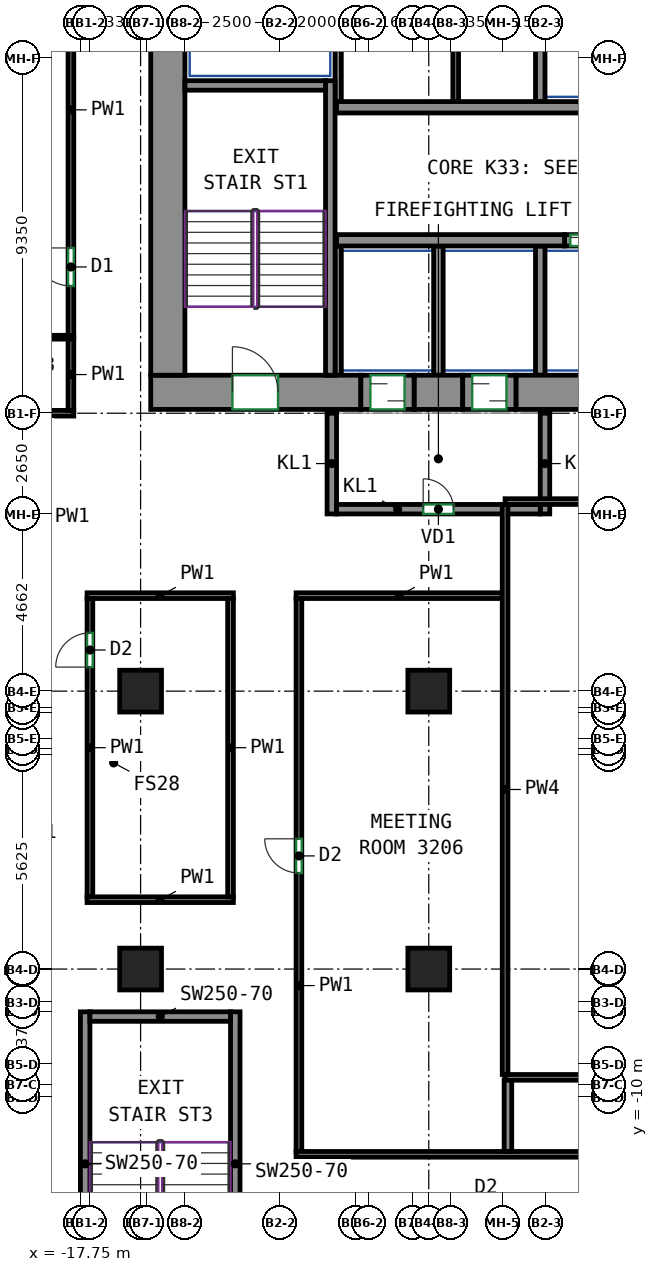
"""IFC4 building model, lengths in metres.
Left out: names, types, materials, properties, quantities, classifications, styles, units other than length and angle.
Written with IfcOpenShell. Run it as: python <this file> out.ifc"""

import sys

from ifc_helpers import new_model, si_unit, direction, frame, frame_2d, origin, origin_2d, place, context, subcontext, project, spatial, rectangle, extrude, source, transform, mapped, element, fill, save


model = new_model("IFC4")
c1 = context("Model", 3, precision=1e-05, world=origin(), true_north=direction((0.0, 1.0)))
c2 = subcontext(c1, "Body", "Model", "MODEL_VIEW")
j1 = project(units=[si_unit("LENGTHUNIT", "METRE"), si_unit("PLANEANGLEUNIT", "RADIAN")], contexts=[c1])
p1 = place(None, origin())
s1 = spatial("IfcSite", under=j1, at=p1, CompositionType="ELEMENT")
p2 = place(p1, origin())
s2 = spatial("IfcBuilding", under=s1, at=p2, CompositionType="ELEMENT")
p3 = place(p2, frame((0.0, 0.0, 143.9)))
s3 = spatial("IfcBuildingStorey", under=s2, at=p3, CompositionType="ELEMENT", Elevation=143.9)
m1 = source(origin(), c2, "Body", "SweptSolid", [
    extrude(rectangle(XDim=1.1, YDim=1.1, at=origin_2d()), origin(), (0.0, 0.0, 1.0), 3.12),
])
for number, where, z_axis, x_axis in (
    (1, (-16.167, -6.625, 0.0), (0.0, 0.0, 1.0), (1.0, 0.0, 0.0)),
    (2, (-16.167, 0.688, 0.0), (0.0, 0.0, 1.0), (1.0, 0.0, 0.0)),
    (3, (-8.583, -6.625, 0.0), (0.0, 0.0, 1.0), (1.0, 0.0, 0.0)),
    (4, (-8.583, 0.688, 0.0), (0.0, 0.0, 1.0), (1.0, 0.0, 0.0)),
):
    element("IfcColumn", number, at=place(p3, frame(where, z_axis=z_axis, x_axis=x_axis)), inside=s3, PredefinedType="COLUMN", context=c2, shape_type="MappedRepresentation", body=[
        mapped(m1, transform((0.0, 0.0, 0.0))),
    ])
m2 = source(origin(), c2, "Body", "SweptSolid", [
    extrude(rectangle(XDim=5.53, YDim=0.9, at=frame_2d((2.765, 0.0))), origin(), (0.0, 0.0, 1.0), 3.12),
])
p4 = place(p3, frame((-15.9, 8.55, 0.0), z_axis=(0.0, 0.0, 1.0), x_axis=(1.0, 0.0, 0.0)))
e5 = element("IfcWall", 5, at=p4, inside=s3, PredefinedType="SHEAR", context=c2, shape_type="MappedRepresentation", body=[
    mapped(m2, transform((0.0, 0.0, 0.0))),
])
p5 = place(p4, frame((2.15, 0.0, 0.0)))
e6 = element("IfcOpeningElement", 6, at=p5, cuts=e5, PredefinedType="OPENING", context=c2, shape_type="SweptSolid", body=[
    extrude(rectangle(XDim=1.2, YDim=2.1, at=frame_2d((0.6, 1.05))), frame((0.0, 0.46, 0.0), z_axis=(0.0, -1.0, 0.0), x_axis=(1.0, 0.0, 0.0)), (0.0, 0.0, 1.0), 0.92),
])
m3 = source(origin(), c2, "Body", "SweptSolid", [
    extrude(rectangle(XDim=1.28, YDim=0.9, at=frame_2d((0.64, 0.0))), origin(), (0.0, 0.0, 1.0), 3.12),
])
p6 = place(p3, frame((-8.97, 8.55, 0.0), z_axis=(0.0, 0.0, 1.0), x_axis=(1.0, 0.0, 0.0)))
e7 = element("IfcWall", 7, at=p6, inside=s3, PredefinedType="SHEAR", context=c2, shape_type="MappedRepresentation", body=[
    mapped(m3, transform((0.0, 0.0, 0.0))),
])
m4 = source(origin(), c2, "Body", "SweptSolid", [
    extrude(rectangle(XDim=14.18, YDim=0.9, at=frame_2d((7.09, 0.0))), origin(), (0.0, 0.0, 1.0), 3.12),
])
p7 = place(p3, frame((-6.29, 8.55, 0.0), z_axis=(0.0, 0.0, 1.0), x_axis=(1.0, 0.0, 0.0)))
e8 = element("IfcWall", 8, at=p7, inside=s3, PredefinedType="SHEAR", context=c2, shape_type="MappedRepresentation", body=[
    mapped(m4, transform((0.0, 0.0, 0.0))),
])
m5 = source(origin(), c2, "Body", "SweptSolid", [
    extrude(rectangle(XDim=12.0, YDim=0.9, at=frame_2d((6.0, 0.0))), origin(), (0.0, 0.0, 1.0), 3.12),
])
p8 = place(p3, frame((-15.45, 9.0, 0.0), z_axis=(0.0, 0.0, 1.0), x_axis=(0.0, 1.0, 0.0)))
e9 = element("IfcWall", 9, at=p8, inside=s3, PredefinedType="SHEAR", context=c2, shape_type="MappedRepresentation", body=[
    mapped(m5, transform((0.0, 0.0, 0.0))),
])
m6 = source(origin(), c2, "Body", "SweptSolid", [
    extrude(rectangle(XDim=7.75, YDim=0.25, at=frame_2d((3.875, 0.0))), origin(), (0.0, 0.0, 1.0), 3.12),
])
p9 = place(p3, frame((-11.175, 9.0, 0.0), z_axis=(0.0, 0.0, 1.0), x_axis=(0.0, 1.0, 0.0)))
e10 = element("IfcWall", 10, at=p9, inside=s3, PredefinedType="SHEAR", context=c2, shape_type="MappedRepresentation", body=[
    mapped(m6, transform((0.0, 0.0, 0.0))),
])
m7 = source(origin(), c2, "Body", "SweptSolid", [
    extrude(rectangle(XDim=3.7, YDim=0.25, at=frame_2d((1.85, 0.0))), origin(), (0.0, 0.0, 1.0), 3.12),
])
p10 = place(p3, frame((-15.0, 16.625, 0.0), z_axis=(0.0, 0.0, 1.0), x_axis=(1.0, 0.0, 0.0)))
e11 = element("IfcWall", 11, at=p10, inside=s3, PredefinedType="SHEAR", context=c2, shape_type="MappedRepresentation", body=[
    mapped(m7, transform((0.0, 0.0, 0.0))),
])
m8 = source(origin(), c2, "Body", "SweptSolid", [
    extrude(rectangle(XDim=8.0, YDim=0.25, at=frame_2d((4.0, 0.0))), origin(), (0.0, 0.0, 1.0), 3.12),
])
for number, where, z_axis, x_axis in (
    (12, (-17.625, -15.75, 0.0), (0.0, 0.0, 1.0), (0.0, 1.0, 0.0)),
    (13, (-13.675, -15.75, 0.0), (0.0, 0.0, 1.0), (0.0, 1.0, 0.0)),
):
    element("IfcWall", number, at=place(p3, frame(where, z_axis=z_axis, x_axis=x_axis)), inside=s3, PredefinedType="SHEAR", context=c2, shape_type="MappedRepresentation", body=[
        mapped(m8, transform((0.0, 0.0, 0.0))),
    ])
p11 = place(p3, frame((-17.5, -7.875, 0.0), z_axis=(0.0, 0.0, 1.0), x_axis=(1.0, 0.0, 0.0)))
e14 = element("IfcWall", 14, at=p11, inside=s3, PredefinedType="SHEAR", context=c2, shape_type="MappedRepresentation", body=[
    mapped(m7, transform((0.0, 0.0, 0.0))),
])
m9 = source(origin(), c2, "Body", "SweptSolid", [
    extrude(rectangle(XDim=6.0, YDim=0.3, at=frame_2d((3.0, 0.0))), origin(), (0.0, 0.0, 1.0), 3.12),
])
p12 = place(p3, frame((-11.01, 12.55, 0.0), z_axis=(0.0, 0.0, 1.0), x_axis=(1.0, 0.0, 0.0)))
e15 = element("IfcWall", 15, at=p12, inside=s3, PredefinedType="SHEAR", context=c2, shape_type="MappedRepresentation", body=[
    mapped(m9, transform((0.0, 0.0, 0.0))),
])
m10 = source(origin(), c2, "Body", "SweptSolid", [
    extrude(rectangle(XDim=14.04, YDim=0.3, at=frame_2d((7.02, 0.0))), origin(), (0.0, 0.0, 1.0), 3.12),
])
p13 = place(p3, frame((-11.01, 16.05, 0.0), z_axis=(0.0, 0.0, 1.0), x_axis=(1.0, 0.0, 0.0)))
e16 = element("IfcWall", 16, at=p13, inside=s3, PredefinedType="SHEAR", context=c2, shape_type="MappedRepresentation", body=[
    mapped(m10, transform((0.0, 0.0, 0.0))),
])
m11 = source(origin(), c2, "Body", "SweptSolid", [
    extrude(rectangle(XDim=1.4, YDim=0.3, at=frame_2d((0.7, 0.0))), origin(), (0.0, 0.0, 1.0), 3.12),
])
p14 = place(p3, frame((-5.01, 12.55, 0.0), z_axis=(0.0, 0.0, 1.0), x_axis=(1.0, 0.0, 0.0)))
e17 = element("IfcWall", 17, at=p14, inside=s3, PredefinedType="PARTITIONING", context=c2, shape_type="MappedRepresentation", body=[
    mapped(m11, transform((0.0, 0.0, 0.0))),
])
p15 = place(p14, frame((0.15, 0.0, 0.0)))
e18 = element("IfcOpeningElement", 18, at=p15, cuts=e17, PredefinedType="OPENING", context=c2, shape_type="SweptSolid", body=[
    extrude(rectangle(XDim=1.1, YDim=2.1, at=frame_2d((0.55, 1.05))), frame((0.0, 0.16, 0.0), z_axis=(0.0, -1.0, 0.0), x_axis=(1.0, 0.0, 0.0)), (0.0, 0.0, 1.0), 0.32),
])
m12 = source(origin(), c2, "Body", "SweptSolid", [
    extrude(rectangle(XDim=2.65, YDim=0.25, at=frame_2d((1.325, 0.0))), origin(), (0.0, 0.0, 1.0), 3.12),
])
for number, where, z_axis, x_axis in (
    (19, (-11.135, 5.35, 0.0), (0.0, 0.0, 1.0), (0.0, 1.0, 0.0)),
    (20, (-5.525, 5.35, 0.0), (0.0, 0.0, 1.0), (0.0, 1.0, 0.0)),
):
    element("IfcWall", number, at=place(p3, frame(where, z_axis=z_axis, x_axis=x_axis)), inside=s3, PredefinedType="PARTITIONING", context=c2, shape_type="MappedRepresentation", body=[
        mapped(m12, transform((0.0, 0.0, 0.0))),
    ])
m13 = source(origin(), c2, "Body", "SweptSolid", [
    extrude(rectangle(XDim=5.36, YDim=0.25, at=frame_2d((2.68, 0.0))), origin(), (0.0, 0.0, 1.0), 3.12),
])
p16 = place(p3, frame((-11.01, 5.475, 0.0), z_axis=(0.0, 0.0, 1.0), x_axis=(1.0, 0.0, 0.0)))
e21 = element("IfcWall", 21, at=p16, inside=s3, PredefinedType="PARTITIONING", context=c2, shape_type="MappedRepresentation", body=[
    mapped(m13, transform((0.0, 0.0, 0.0))),
])
p17 = place(p16, frame((2.28, 0.0, 0.0)))
e22 = element("IfcOpeningElement", 22, at=p17, cuts=e21, PredefinedType="OPENING", context=c2, shape_type="SweptSolid", body=[
    extrude(rectangle(XDim=0.8, YDim=2.0, at=frame_2d((0.4, 1.0))), frame((0.0, 0.135, 0.0), z_axis=(0.0, -1.0, 0.0), x_axis=(1.0, 0.0, 0.0)), (0.0, 0.0, 1.0), 0.27),
])
m14 = source(origin(), c2, "Body", "SweptSolid", [
    extrude(rectangle(XDim=4.8, YDim=0.165, at=frame_2d((2.4, 0.0))), origin(), (0.0, 0.0, 1.0), 3.12),
])
p18 = place(p3, frame((-10.968, 16.2, 0.0), z_axis=(0.0, 0.0, 1.0), x_axis=(0.0, 1.0, 0.0)))
e23 = element("IfcWall", 23, at=p18, inside=s3, PredefinedType="PARTITIONING", context=c2, shape_type="MappedRepresentation", body=[
    mapped(m14, transform((0.0, 0.0, 0.0))),
])
m15 = source(origin(), c2, "Body", "SweptSolid", [
    extrude(rectangle(XDim=3.275, YDim=0.25, at=frame_2d((1.638, 0.0))), origin(), (0.0, 0.0, 1.0), 3.12),
])
p19 = place(p3, frame((-5.65, 16.2, 0.0), z_axis=(0.0, 0.0, 1.0), x_axis=(0.0, 1.0, 0.0)))
e24 = element("IfcWall", 24, at=p19, inside=s3, PredefinedType="PARTITIONING", context=c2, shape_type="MappedRepresentation", body=[
    mapped(m15, transform((0.0, 0.0, 0.0))),
])
m16 = source(origin(), c2, "Body", "SweptSolid", [
    extrude(rectangle(XDim=3.4, YDim=0.165, at=frame_2d((1.7, 0.0))), origin(), (0.0, 0.0, 1.0), 3.12),
])
p20 = place(p3, frame((-10.968, 9.0, 0.0), z_axis=(0.0, 0.0, 1.0), x_axis=(0.0, 1.0, 0.0)))
e25 = element("IfcWall", 25, at=p20, inside=s3, PredefinedType="PARTITIONING", context=c2, shape_type="MappedRepresentation", body=[
    mapped(m16, transform((0.0, 0.0, 0.0))),
])
m17 = source(origin(), c2, "Body", "SweptSolid", [
    extrude(rectangle(XDim=3.4, YDim=0.25, at=frame_2d((1.7, 0.0))), origin(), (0.0, 0.0, 1.0), 3.12),
])
for number, where, z_axis, x_axis in (
    (26, (-5.65, 9.0, 0.0), (0.0, 0.0, 1.0), (0.0, 1.0, 0.0)),
    (27, (-8.33, 9.0, 0.0), (0.0, 0.0, 1.0), (0.0, 1.0, 0.0)),
):
    element("IfcWall", number, at=place(p3, frame(where, z_axis=z_axis, x_axis=x_axis)), inside=s3, PredefinedType="PARTITIONING", context=c2, shape_type="MappedRepresentation", body=[
        mapped(m17, transform((0.0, 0.0, 0.0))),
    ])
m18 = source(origin(), c2, "Body", "SweptSolid", [
    extrude(rectangle(XDim=4.8, YDim=0.15, at=frame_2d((2.4, 0.0))), origin(), (0.0, 0.0, 1.0), 3.12),
])
p21 = place(p3, frame((-7.875, 16.2, 0.0), z_axis=(0.0, 0.0, 1.0), x_axis=(0.0, 1.0, 0.0)))
e28 = element("IfcWall", 28, at=p21, inside=s3, PredefinedType="PARTITIONING", context=c2, shape_type="MappedRepresentation", body=[
    mapped(m18, transform((0.0, 0.0, 0.0))),
])
m19 = source(origin(), c2, "Body", "SweptSolid", [
    extrude(rectangle(XDim=1.4, YDim=0.9, at=frame_2d((0.7, 0.0))), origin(), (0.0, 0.0, 1.0), 2.7),
])
p22 = place(p3, frame((-10.37, 8.55, 0.0), z_axis=(0.0, 0.0, 1.0), x_axis=(1.0, 0.0, 0.0)))
e29 = element("IfcWall", 29, at=p22, inside=s3, PredefinedType="PARTITIONING", context=c2, shape_type="MappedRepresentation", body=[
    mapped(m19, transform((0.0, 0.0, 0.0))),
])
p23 = place(p22, frame((0.25, 0.0, 0.0)))
e30 = element("IfcOpeningElement", 30, at=p23, cuts=e29, PredefinedType="OPENING", context=c2, shape_type="SweptSolid", body=[
    extrude(rectangle(XDim=0.9, YDim=2.1, at=frame_2d((0.45, 1.05))), frame((0.0, 0.46, 0.0), z_axis=(0.0, -1.0, 0.0), x_axis=(1.0, 0.0, 0.0)), (0.0, 0.0, 1.0), 0.92),
])
m20 = source(origin(), c2, "Body", "SweptSolid", [
    extrude(rectangle(XDim=1.4, YDim=0.9, at=frame_2d((0.7, 0.0))), origin(), (0.0, 0.0, 1.0), 2.7),
])
p24 = place(p3, frame((-7.69, 8.55, 0.0), z_axis=(0.0, 0.0, 1.0), x_axis=(1.0, 0.0, 0.0)))
e31 = element("IfcWall", 31, at=p24, inside=s3, PredefinedType="PARTITIONING", context=c2, shape_type="MappedRepresentation", body=[
    mapped(m20, transform((0.0, 0.0, 0.0))),
])
p25 = place(p24, frame((0.25, 0.0, 0.0)))
e32 = element("IfcOpeningElement", 32, at=p25, cuts=e31, PredefinedType="OPENING", context=c2, shape_type="SweptSolid", body=[
    extrude(rectangle(XDim=0.9, YDim=2.1, at=frame_2d((0.45, 1.05))), frame((0.0, 0.46, 0.0), z_axis=(0.0, -1.0, 0.0), x_axis=(1.0, 0.0, 0.0)), (0.0, 0.0, 1.0), 0.92),
])
p26 = place(p3, frame((-18.0, 10.04, 0.0), z_axis=(0.0, 0.0, 1.0), x_axis=(0.0, 1.0, 0.0)))
e33 = element("IfcWall", 33, at=p26, inside=s3, PredefinedType="PARTITIONING", context=c2, shape_type="SweptSolid", body=[
    extrude(rectangle(XDim=11.885, YDim=0.15, at=frame_2d((5.942, 0.0))), origin(), (0.0, 0.0, 1.0), 3.12),
])
p27 = place(p26, frame((1.309, 0.0, 0.0)))
e34 = element("IfcOpeningElement", 34, at=p27, cuts=e33, PredefinedType="OPENING", context=c2, shape_type="SweptSolid", body=[
    extrude(rectangle(XDim=1.0, YDim=2.1, at=frame_2d((0.5, 1.05))), frame((0.0, 0.085, 0.0), z_axis=(0.0, -1.0, 0.0), x_axis=(1.0, 0.0, 0.0)), (0.0, 0.0, 1.0), 0.17),
])
p28 = place(p3, frame((-17.925, 8.0, 0.0), z_axis=(0.0, 0.0, 1.0), x_axis=(-1.0, 0.0, 0.0)))
e35 = element("IfcWall", 35, at=p28, inside=s3, PredefinedType="PARTITIONING", context=c2, shape_type="SweptSolid", body=[
    extrude(rectangle(XDim=2.034, YDim=0.15, at=frame_2d((1.017, 0.0))), origin(), (0.0, 0.0, 1.0), 3.12),
])
p29 = place(p3, frame((-18.0, 8.075, 0.0), z_axis=(0.0, 0.0, 1.0), x_axis=(0.0, 1.0, 0.0)))
e36 = element("IfcWall", 36, at=p29, inside=s3, PredefinedType="PARTITIONING", context=c2, shape_type="SweptSolid", body=[
    extrude(rectangle(XDim=1.885, YDim=0.15, at=frame_2d((0.942, 0.0))), origin(), (0.0, 0.0, 1.0), 3.12),
])
p30 = place(p3, frame((-12.075, 3.2, 0.0), z_axis=(0.0, 0.0, 1.0), x_axis=(1.0, 0.0, 0.0)))
e37 = element("IfcWall", 37, at=p30, inside=s3, PredefinedType="PARTITIONING", context=c2, shape_type="SweptSolid", body=[
    extrude(rectangle(XDim=5.425, YDim=0.15, at=frame_2d((2.712, 0.0))), origin(), (0.0, 0.0, 1.0), 3.12),
])
p31 = place(p3, frame((-12.0, -11.425, 0.0), z_axis=(0.0, 0.0, 1.0), x_axis=(0.0, 1.0, 0.0)))
e38 = element("IfcWall", 38, at=p31, inside=s3, PredefinedType="PARTITIONING", context=c2, shape_type="SweptSolid", body=[
    extrude(rectangle(XDim=14.55, YDim=0.15, at=frame_2d((7.275, 0.0))), origin(), (0.0, 0.0, 1.0), 3.12),
])
p32 = place(p31, frame((7.327, 0.0, 0.0)))
e39 = element("IfcOpeningElement", 39, at=p32, cuts=e38, PredefinedType="OPENING", context=c2, shape_type="SweptSolid", body=[
    extrude(rectangle(XDim=0.9, YDim=2.1, at=frame_2d((0.45, 1.05))), frame((0.0, 0.085, 0.0), z_axis=(0.0, -1.0, 0.0), x_axis=(1.0, 0.0, 0.0)), (0.0, 0.0, 1.0), 0.17),
])
p33 = place(p3, frame((-12.075, -11.5, 0.0), z_axis=(0.0, 0.0, 1.0), x_axis=(1.0, 0.0, 0.0)))
e40 = element("IfcWall", 40, at=p33, inside=s3, PredefinedType="PARTITIONING", context=c2, shape_type="SweptSolid", body=[
    extrude(rectangle(XDim=28.35, YDim=0.15, at=frame_2d((14.175, 0.0))), origin(), (0.0, 0.0, 1.0), 3.12),
])
p34 = place(p33, frame((13.677, 0.0, 0.0)))
e41 = element("IfcOpeningElement", 41, at=p34, cuts=e40, PredefinedType="OPENING", context=c2, shape_type="SweptSolid", body=[
    extrude(rectangle(XDim=0.9, YDim=2.1, at=frame_2d((0.45, 1.05))), frame((0.0, 0.085, 0.0), z_axis=(0.0, -1.0, 0.0), x_axis=(1.0, 0.0, 0.0)), (0.0, 0.0, 1.0), 0.17),
])
p35 = place(p3, frame((-17.575, 3.2, 0.0), z_axis=(0.0, 0.0, 1.0), x_axis=(1.0, 0.0, 0.0)))
e42 = element("IfcWall", 42, at=p35, inside=s3, PredefinedType="PARTITIONING", context=c2, shape_type="SweptSolid", body=[
    extrude(rectangle(XDim=3.85, YDim=0.15, at=frame_2d((1.925, 0.0))), origin(), (0.0, 0.0, 1.0), 3.12),
])
p36 = place(p3, frame((-17.5, -4.725, 0.0), z_axis=(0.0, 0.0, 1.0), x_axis=(0.0, 1.0, 0.0)))
e43 = element("IfcWall", 43, at=p36, inside=s3, PredefinedType="PARTITIONING", context=c2, shape_type="SweptSolid", body=[
    extrude(rectangle(XDim=7.85, YDim=0.15, at=frame_2d((3.925, 0.0))), origin(), (0.0, 0.0, 1.0), 3.12),
])
p37 = place(p36, frame((6.045, 0.0, 0.0)))
e44 = element("IfcOpeningElement", 44, at=p37, cuts=e43, PredefinedType="OPENING", context=c2, shape_type="SweptSolid", body=[
    extrude(rectangle(XDim=0.9, YDim=2.1, at=frame_2d((0.45, 1.05))), frame((0.0, 0.085, 0.0), z_axis=(0.0, -1.0, 0.0), x_axis=(1.0, 0.0, 0.0)), (0.0, 0.0, 1.0), 0.17),
])
p38 = place(p3, frame((-13.725, -4.8, 0.0), z_axis=(0.0, 0.0, 1.0), x_axis=(-1.0, 0.0, 0.0)))
e45 = element("IfcWall", 45, at=p38, inside=s3, PredefinedType="PARTITIONING", context=c2, shape_type="SweptSolid", body=[
    extrude(rectangle(XDim=3.85, YDim=0.15, at=frame_2d((1.925, 0.0))), origin(), (0.0, 0.0, 1.0), 3.12),
])
p39 = place(p3, frame((-13.8, 3.125, 0.0), z_axis=(0.0, 0.0, 1.0), x_axis=(0.0, -1.0, 0.0)))
e46 = element("IfcWall", 46, at=p39, inside=s3, PredefinedType="PARTITIONING", context=c2, shape_type="SweptSolid", body=[
    extrude(rectangle(XDim=7.85, YDim=0.15, at=frame_2d((3.925, 0.0))), origin(), (0.0, 0.0, 1.0), 3.12),
])
p40 = place(p3, frame((-20.752, 10.0, 0.0), z_axis=(0.0, 0.0, 1.0), x_axis=(1.0, 0.0, 0.0)))
e47 = element("IfcWall", 47, at=p40, inside=s3, PredefinedType="PARTITIONING", context=c2, shape_type="SweptSolid", body=[
    extrude(rectangle(XDim=2.825, YDim=0.1, at=frame_2d((1.413, 0.0))), origin(), (0.0, 0.0, 1.0), 3.12),
])
p41 = place(p40, frame((1.318, 0.0, 0.0)))
e48 = element("IfcOpeningElement", 48, at=p41, cuts=e47, PredefinedType="OPENING", context=c2, shape_type="SweptSolid", body=[
    extrude(rectangle(XDim=0.9, YDim=2.1, at=frame_2d((0.45, 1.05))), frame((0.0, 0.06, 0.0), z_axis=(0.0, -1.0, 0.0), x_axis=(1.0, 0.0, 0.0)), (0.0, 0.0, 1.0), 0.12),
])
p42 = place(p3, frame((-6.5, -11.423, 0.0), z_axis=(0.0, 0.0, 1.0), x_axis=(0.0, 1.0, 0.0)))
e49 = element("IfcWall", 49, at=p42, inside=s3, PredefinedType="PARTITIONING", context=c2, shape_type="SweptSolid", body=[
    extrude(rectangle(XDim=1.883, YDim=0.2, at=frame_2d((0.941, 0.0))), origin(), (0.0, 0.0, 1.0), 3.12),
])
p43 = place(p3, frame((8.5, -9.475, 0.0), z_axis=(0.0, 0.0, 1.0), x_axis=(-1.0, 0.0, 0.0)))
e50 = element("IfcWall", 50, at=p43, inside=s3, PredefinedType="PARTITIONING", context=c2, shape_type="SweptSolid", body=[
    extrude(rectangle(XDim=15.075, YDim=0.15, at=frame_2d((7.538, 0.0))), origin(), (0.0, 0.0, 1.0), 3.12),
])
p44 = place(p3, frame((-6.575, -9.4, 0.0), z_axis=(0.0, 0.0, 1.0), x_axis=(0.0, 1.0, 0.0)))
e51 = element("IfcWall", 51, at=p44, inside=s3, PredefinedType="PARTITIONING", context=c2, shape_type="SweptSolid", body=[
    extrude(rectangle(XDim=15.0, YDim=0.15, at=frame_2d((7.5, 0.0))), origin(), (0.0, 0.0, 1.0), 3.12),
])
p45 = place(p3, frame((-6.575, 5.675, 0.0), z_axis=(0.0, 0.0, 1.0), x_axis=(1.0, 0.0, 0.0)))
e52 = element("IfcWall", 52, at=p45, inside=s3, PredefinedType="PARTITIONING", context=c2, shape_type="SweptSolid", body=[
    extrude(rectangle(XDim=15.075, YDim=0.15, at=frame_2d((7.538, 0.0))), origin(), (0.0, 0.0, 1.0), 3.12),
])
p46 = place(p17, origin())
e53 = element("IfcDoor", 53, at=p46, inside=s3, OperationType="SINGLE_SWING_LEFT", PredefinedType="DOOR", context=c2, shape_type="SweptSolid", body=[
    extrude(rectangle(XDim=0.8, YDim=2.0, at=frame_2d((0.4, 1.0))), frame((0.0, 0.025, 0.0), z_axis=(0.0, -1.0, 0.0), x_axis=(1.0, 0.0, 0.0)), (0.0, 0.0, 1.0), 0.05),
])
fill(e22, e53)
p47 = place(p23, origin())
e54 = element("IfcDoor", 54, at=p47, inside=s3, OperationType="SLIDING_TO_LEFT", PredefinedType="DOOR", context=c2, shape_type="SweptSolid", body=[
    extrude(rectangle(XDim=0.9, YDim=2.1, at=frame_2d((0.45, 1.05))), frame((0.0, 0.355, 0.0), z_axis=(0.0, -1.0, 0.0), x_axis=(1.0, 0.0, 0.0)), (0.0, 0.0, 1.0), 0.05),
])
fill(e30, e54)
p48 = place(p25, origin())
e55 = element("IfcDoor", 55, at=p48, inside=s3, OperationType="SLIDING_TO_RIGHT", PredefinedType="DOOR", context=c2, shape_type="SweptSolid", body=[
    extrude(rectangle(XDim=0.9, YDim=2.1, at=frame_2d((0.45, 1.05))), frame((0.0, 0.355, 0.0), z_axis=(0.0, -1.0, 0.0), x_axis=(1.0, 0.0, 0.0)), (0.0, 0.0, 1.0), 0.05),
])
fill(e32, e55)
p49 = place(p15, origin())
e56 = element("IfcDoor", 56, at=p49, inside=s3, OperationType="DOUBLE_DOOR_SLIDING", PredefinedType="DOOR", context=c2, shape_type="SweptSolid", body=[
    extrude(rectangle(XDim=1.1, YDim=2.1, at=frame_2d((0.55, 1.05))), frame((0.0, 0.025, 0.0), z_axis=(0.0, -1.0, 0.0), x_axis=(1.0, 0.0, 0.0)), (0.0, 0.0, 1.0), 0.05),
])
fill(e18, e56)
p50 = place(p5, origin())
e57 = element("IfcDoor", 57, at=p50, inside=s3, OperationType="DOUBLE_DOOR_SINGLE_SWING", PredefinedType="DOOR", context=c2, shape_type="SweptSolid", body=[
    extrude(rectangle(XDim=1.2, YDim=2.1, at=frame_2d((0.6, 1.05))), frame((0.0, 0.355, 0.0), z_axis=(0.0, -1.0, 0.0), x_axis=(1.0, 0.0, 0.0)), (0.0, 0.0, 1.0), 0.05),
])
fill(e6, e57)
p51 = place(p32, origin())
e58 = element("IfcDoor", 58, at=p51, inside=s3, OperationType="SINGLE_SWING_RIGHT", PredefinedType="DOOR", context=c2, shape_type="SweptSolid", body=[
    extrude(rectangle(XDim=0.9, YDim=2.1, at=frame_2d((0.45, 1.05))), frame((0.0, 0.025, 0.0), z_axis=(0.0, -1.0, 0.0), x_axis=(1.0, 0.0, 0.0)), (0.0, 0.0, 1.0), 0.05),
])
fill(e39, e58)
p52 = place(p37, origin())
e59 = element("IfcDoor", 59, at=p52, inside=s3, OperationType="SINGLE_SWING_LEFT", PredefinedType="DOOR", context=c2, shape_type="SweptSolid", body=[
    extrude(rectangle(XDim=0.9, YDim=2.1, at=frame_2d((0.45, 1.05))), frame((0.0, 0.025, 0.0), z_axis=(0.0, -1.0, 0.0), x_axis=(1.0, 0.0, 0.0)), (0.0, 0.0, 1.0), 0.05),
])
fill(e44, e59)
p53 = place(p27, origin())
e60 = element("IfcDoor", 60, at=p53, inside=s3, OperationType="SINGLE_SWING_RIGHT", PredefinedType="DOOR", context=c2, shape_type="SweptSolid", body=[
    extrude(rectangle(XDim=1.0, YDim=2.1, at=frame_2d((0.5, 1.05))), frame((0.0, 0.025, 0.0), z_axis=(0.0, -1.0, 0.0), x_axis=(1.0, 0.0, 0.0)), (0.0, 0.0, 1.0), 0.05),
])
fill(e34, e60)
save(model, sys.argv[1])
